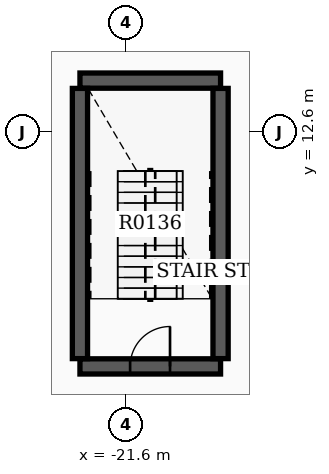
"""IFC4 building model, lengths in metres.
Left out: names, types, materials, properties, quantities, classifications, styles, units other than length and angle.
Written with IfcOpenShell. Run it as: python <this file> out.ifc"""

import sys

from ifc_helpers import new_model, si_unit, direction, frame, frame_2d, origin, place, context, subcontext, project, spatial, rectangle, extrude, element, fill, save


model = new_model("IFC4")
c1 = context("Model", 3, precision=1e-05, world=origin(), true_north=direction((0.0, 1.0)))
c2 = subcontext(c1, "Body", "Model", "MODEL_VIEW")
j1 = project(units=[si_unit("LENGTHUNIT", "METRE"), si_unit("PLANEANGLEUNIT", "RADIAN")], contexts=[c1])
p1 = place(None, origin())
s1 = spatial("IfcSite", under=j1, at=p1, CompositionType="ELEMENT")
p2 = place(p1, origin())
s2 = spatial("IfcBuilding", under=s1, at=p2, CompositionType="ELEMENT")
p3 = place(p2, frame((0.0, 0.0, 5.4)))
s3 = spatial("IfcBuildingStorey", under=s2, at=p3, CompositionType="ELEMENT", Elevation=5.4)
p4 = place(p3, frame((-22.82, 13.95, 0.0), z_axis=(0.0, 0.0, 1.0), x_axis=(1.0, 0.0, 0.0)))
e1 = element("IfcWall", 1, at=p4, inside=s3, PredefinedType="SHEAR", context=c2, shape_type="SweptSolid", body=[
    extrude(rectangle(XDim=3.7, YDim=0.4, at=frame_2d((1.85, 0.0))), origin(), (0.0, 0.0, 1.0), 4.55),
])
p5 = place(p3, frame((-22.82, 6.43, 0.0), z_axis=(0.0, 0.0, 1.0), x_axis=(1.0, 0.0, 0.0)))
e2 = element("IfcWall", 2, at=p5, inside=s3, PredefinedType="SHEAR", context=c2, shape_type="SweptSolid", body=[
    extrude(rectangle(XDim=3.7, YDim=0.4, at=frame_2d((1.85, 0.0))), origin(), (0.0, 0.0, 1.0), 4.55),
])
p6 = place(p5, frame((1.32, 0.0, 0.0)))
e3 = element("IfcOpeningElement", 3, at=p6, cuts=e2, PredefinedType="OPENING", context=c2, shape_type="SweptSolid", body=[
    extrude(rectangle(XDim=1.05, YDim=2.15, at=frame_2d((0.525, 1.075))), frame((0.0, 0.21, 0.0), z_axis=(0.0, -1.0, 0.0), x_axis=(1.0, 0.0, 0.0)), (0.0, 0.0, 1.0), 0.42),
])
for number, where, z_axis, x_axis in (
    (4, (-22.82, 6.635, 0.0), (0.0, 0.0, 1.0), (0.0, 1.0, 0.0)),
    (5, (-19.12, 6.635, 0.0), (0.0, 0.0, 1.0), (0.0, 1.0, 0.0)),
):
    element("IfcWall", number, at=place(p3, frame(where, z_axis=z_axis, x_axis=x_axis)), inside=s3, PredefinedType="SHEAR", context=c2, shape_type="SweptSolid", body=[
        extrude(rectangle(XDim=7.11, YDim=0.4, at=frame_2d((3.555, 0.0))), origin(), (0.0, 0.0, 1.0), 4.55),
    ])
p7 = place(p6, origin())
e6 = element("IfcDoor", 6, at=p7, inside=s3, OperationType="SINGLE_SWING_RIGHT", PredefinedType="DOOR", context=c2, shape_type="SweptSolid", body=[
    extrude(rectangle(XDim=1.05, YDim=2.15, at=frame_2d((0.525, 1.075))), frame((0.0, 0.025, 0.0), z_axis=(0.0, -1.0, 0.0), x_axis=(1.0, 0.0, 0.0)), (0.0, 0.0, 1.0), 0.05),
])
fill(e3, e6)
save(model, sys.argv[1])
